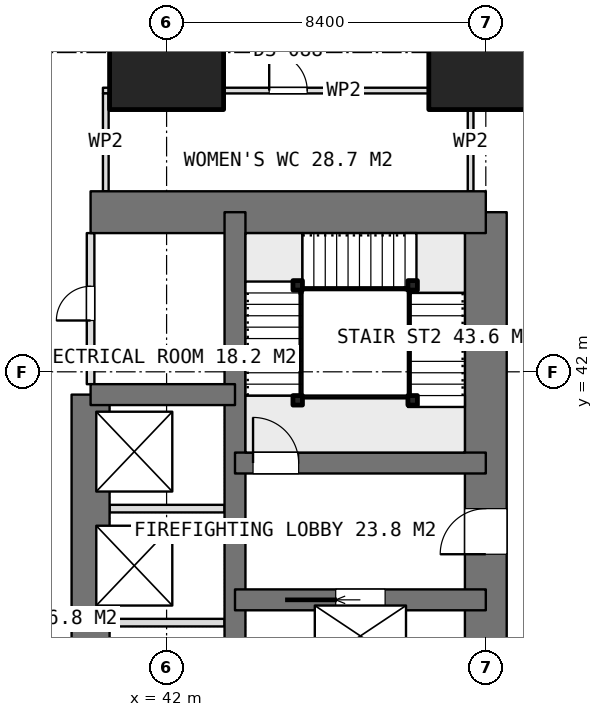
"""IFC4 building model, lengths in metres.
Left out: names, types, materials, properties, quantities, classifications, styles, units other than length and angle.
Written with IfcOpenShell. Run it as: python <this file> out.ifc"""

import sys

from ifc_helpers import new_model, si_unit, direction, frame, frame_2d, origin, origin_2d, place, context, subcontext, project, spatial, rectangle, extrude, element, fill, save


model = new_model("IFC4")
c1 = context("Model", 3, precision=1e-05, world=origin(), true_north=direction((0.0, 1.0)))
c2 = subcontext(c1, "Body", "Model", "MODEL_VIEW")
j1 = project(units=[si_unit("LENGTHUNIT", "METRE"), si_unit("PLANEANGLEUNIT", "RADIAN")], contexts=[c1])
p1 = place(None, origin())
s1 = spatial("IfcSite", under=j1, at=p1, CompositionType="ELEMENT")
p2 = place(p1, origin())
s2 = spatial("IfcBuilding", under=s1, at=p2, CompositionType="ELEMENT")
p3 = place(p2, frame((0.0, 0.0, 77.9)))
s3 = spatial("IfcBuildingStorey", under=s2, at=p3, CompositionType="ELEMENT", Elevation=77.9)
p4 = place(p3, frame((40.0, 46.2, 0.0), z_axis=(0.0, 0.0, 1.0), x_axis=(1.0, 0.0, 0.0)))
e1 = element("IfcWall", 1, at=p4, inside=s3, PredefinedType="SHEAR", context=c2, shape_type="SweptSolid", body=[
    extrude(rectangle(XDim=10.4, YDim=1.1, at=frame_2d((5.2, 0.0))), origin(), (0.0, 0.0, 1.0), 3.75),
])
p5 = place(p3, frame((50.4, 21.0, 0.0), z_axis=(0.0, 0.0, 1.0), x_axis=(0.0, 1.0, 0.0)))
e2 = element("IfcWall", 2, at=p5, inside=s3, PredefinedType="SHEAR", context=c2, shape_type="SweptSolid", body=[
    extrude(rectangle(XDim=25.2, YDim=1.1, at=frame_2d((12.6, 0.0))), origin(), (0.0, 0.0, 1.0), 3.75),
])
p6 = place(p5, frame((16.2, 0.0, 0.0)))
e3 = element("IfcOpeningElement", 3, at=p6, cuts=e2, PredefinedType="OPENING", context=c2, shape_type="SweptSolid", body=[
    extrude(rectangle(XDim=1.2, YDim=2.1, at=frame_2d((0.6, 1.05))), frame((0.0, 0.56, 0.0), z_axis=(0.0, -1.0, 0.0), x_axis=(1.0, 0.0, 0.0)), (0.0, 0.0, 1.0), 1.12),
])
p7 = place(p5, frame((10.05, 0.0, 0.0)))
e4 = element("IfcOpeningElement", 4, at=p7, cuts=e2, PredefinedType="OPENING", context=c2, shape_type="SweptSolid", body=[
    extrude(rectangle(XDim=0.9, YDim=2.1, at=frame_2d((0.45, 1.05))), frame((0.0, 0.56, 0.0), z_axis=(0.0, -1.0, 0.0), x_axis=(1.0, 0.0, 0.0)), (0.0, 0.0, 1.0), 1.12),
])
p8 = place(p5, frame((7.45, 0.0, 0.0)))
e5 = element("IfcOpeningElement", 5, at=p8, cuts=e2, PredefinedType="OPENING", context=c2, shape_type="SweptSolid", body=[
    extrude(rectangle(XDim=0.9, YDim=2.1, at=frame_2d((0.45, 1.05))), frame((0.0, 0.56, 0.0), z_axis=(0.0, -1.0, 0.0), x_axis=(1.0, 0.0, 0.0)), (0.0, 0.0, 1.0), 1.12),
])
p9 = place(p5, frame((0.75, 0.0, 0.0)))
e6 = element("IfcOpeningElement", 6, at=p9, cuts=e2, PredefinedType="OPENING", context=c2, shape_type="SweptSolid", body=[
    extrude(rectangle(XDim=1.2, YDim=2.1, at=frame_2d((0.6, 1.05))), frame((0.0, 0.56, 0.0), z_axis=(0.0, -1.0, 0.0), x_axis=(1.0, 0.0, 0.0)), (0.0, 0.0, 1.0), 1.12),
])
p10 = place(p3, frame((43.8, 21.0, 0.0), z_axis=(0.0, 0.0, 1.0), x_axis=(0.0, 1.0, 0.0)))
e7 = element("IfcWall", 7, at=p10, inside=s3, PredefinedType="SHEAR", context=c2, shape_type="SweptSolid", body=[
    extrude(rectangle(XDim=25.2, YDim=0.55, at=frame_2d((12.6, 0.0))), origin(), (0.0, 0.0, 1.0), 3.75),
])
p11 = place(p3, frame((40.0, 23.4, 0.0), z_axis=(0.0, 0.0, 1.0), x_axis=(0.0, 1.0, 0.0)))
e8 = element("IfcWall", 8, at=p11, inside=s3, PredefinedType="SHEAR", context=c2, shape_type="SweptSolid", body=[
    extrude(rectangle(XDim=18.0, YDim=1.0, at=frame_2d((9.0, 0.0))), origin(), (0.0, 0.0, 1.0), 3.75),
])
p12 = place(p3, frame((40.0, 41.4, 0.0), z_axis=(0.0, 0.0, 1.0), x_axis=(1.0, 0.0, 0.0)))
e9 = element("IfcWall", 9, at=p12, inside=s3, PredefinedType="SHEAR", context=c2, shape_type="SweptSolid", body=[
    extrude(rectangle(XDim=3.8, YDim=0.55, at=frame_2d((1.9, 0.0))), origin(), (0.0, 0.0, 1.0), 3.75),
])
p13 = place(p3, frame((43.8, 36.0, 0.0), z_axis=(0.0, 0.0, 1.0), x_axis=(1.0, 0.0, 0.0)))
e10 = element("IfcWall", 10, at=p13, inside=s3, PredefinedType="SHEAR", context=c2, shape_type="SweptSolid", body=[
    extrude(rectangle(XDim=6.6, YDim=0.55, at=frame_2d((3.3, 0.0))), origin(), (0.0, 0.0, 1.0), 3.75),
])
p14 = place(p13, frame((2.65, 0.0, 0.0)))
e11 = element("IfcOpeningElement", 11, at=p14, cuts=e10, PredefinedType="OPENING", context=c2, shape_type="SweptSolid", body=[
    extrude(rectangle(XDim=1.3, YDim=2.1, at=frame_2d((0.65, 1.05))), frame((0.0, 0.285, 0.0), z_axis=(0.0, -1.0, 0.0), x_axis=(1.0, 0.0, 0.0)), (0.0, 0.0, 1.0), 0.57),
])
p15 = place(p3, frame((43.8, 39.6, 0.0), z_axis=(0.0, 0.0, 1.0), x_axis=(1.0, 0.0, 0.0)))
e12 = element("IfcWall", 12, at=p15, inside=s3, PredefinedType="SHEAR", context=c2, shape_type="SweptSolid", body=[
    extrude(rectangle(XDim=6.6, YDim=0.55, at=frame_2d((3.3, 0.0))), origin(), (0.0, 0.0, 1.0), 3.75),
])
p16 = place(p15, frame((0.475, 0.0, 0.0)))
e13 = element("IfcOpeningElement", 13, at=p16, cuts=e12, PredefinedType="OPENING", context=c2, shape_type="SweptSolid", body=[
    extrude(rectangle(XDim=1.2, YDim=2.1, at=frame_2d((0.6, 1.05))), frame((0.0, 0.285, 0.0), z_axis=(0.0, -1.0, 0.0), x_axis=(1.0, 0.0, 0.0)), (0.0, 0.0, 1.0), 0.57),
])
for number, where, z_axis, x_axis in (
    (14, (42.0, 50.4, 0.0), (0.0, 0.0, 1.0), (1.0, 0.0, 0.0)),
    (15, (50.4, 50.4, 0.0), (0.0, 0.0, 1.0), (1.0, 0.0, 0.0)),
):
    element("IfcColumn", number, at=place(p3, frame(where, z_axis=z_axis, x_axis=x_axis)), inside=s3, PredefinedType="COLUMN", context=c2, shape_type="SweptSolid", body=[
        extrude(rectangle(XDim=3.0, YDim=3.0, at=origin_2d()), origin(), (0.0, 0.0, 1.0), 3.75),
    ])
for number, where, z_axis, x_axis in (
    (16, (40.5, 35.4, 0.0), (0.0, 0.0, 1.0), (1.0, 0.0, 0.0)),
    (17, (40.5, 38.4, 0.0), (0.0, 0.0, 1.0), (1.0, 0.0, 0.0)),
):
    element("IfcWall", number, at=place(p3, frame(where, z_axis=z_axis, x_axis=x_axis)), inside=s3, PredefinedType="PARTITIONING", context=c2, shape_type="SweptSolid", body=[
        extrude(rectangle(XDim=3.025, YDim=0.2, at=frame_2d((1.512, 0.0))), origin(), (0.0, 0.0, 1.0), 3.5),
    ])
p17 = place(p3, frame((40.0, 41.675, 0.0), z_axis=(0.0, 0.0, 1.0), x_axis=(0.0, 1.0, 0.0)))
e18 = element("IfcWall", 18, at=p17, inside=s3, PredefinedType="PARTITIONING", context=c2, shape_type="SweptSolid", body=[
    extrude(rectangle(XDim=3.975, YDim=0.2, at=frame_2d((1.987, 0.0))), origin(), (0.0, 0.0, 1.0), 3.5),
])
p18 = place(p17, frame((1.675, 0.0, 0.0)))
e19 = element("IfcOpeningElement", 19, at=p18, cuts=e18, PredefinedType="OPENING", context=c2, shape_type="SweptSolid", body=[
    extrude(rectangle(XDim=0.9, YDim=2.1, at=frame_2d((0.45, 1.05))), frame((0.0, 0.11, 0.0), z_axis=(0.0, -1.0, 0.0), x_axis=(1.0, 0.0, 0.0)), (0.0, 0.0, 1.0), 0.22),
])
p19 = place(p3, frame((40.325, 49.4, 0.0), z_axis=(0.0, 0.0, 1.0), x_axis=(1.0, 0.0, 0.0)))
e20 = element("IfcWall", 20, at=p19, inside=s3, PredefinedType="PARTITIONING", context=c2, shape_type="SweptSolid", body=[
    extrude(rectangle(XDim=9.75, YDim=0.15, at=frame_2d((4.875, 0.0))), origin(), (0.0, 0.0, 1.0), 3.5),
])
p20 = place(p19, frame((4.375, 0.0, 0.0)))
e21 = element("IfcOpeningElement", 21, at=p20, cuts=e20, PredefinedType="OPENING", context=c2, shape_type="SweptSolid", body=[
    extrude(rectangle(XDim=1.0, YDim=2.1, at=frame_2d((0.5, 1.05))), frame((0.0, 0.085, 0.0), z_axis=(0.0, -1.0, 0.0), x_axis=(1.0, 0.0, 0.0)), (0.0, 0.0, 1.0), 0.17),
])
for number, where, z_axis, x_axis in (
    (22, (40.4, 46.75, 0.0), (0.0, 0.0, 1.0), (0.0, 1.0, 0.0)),
    (23, (50.0, 46.75, 0.0), (0.0, 0.0, 1.0), (0.0, 1.0, 0.0)),
):
    element("IfcWall", number, at=place(p3, frame(where, z_axis=z_axis, x_axis=x_axis)), inside=s3, PredefinedType="PARTITIONING", context=c2, shape_type="SweptSolid", body=[
        extrude(rectangle(XDim=2.575, YDim=0.15, at=frame_2d((1.288, 0.0))), origin(), (0.0, 0.0, 1.0), 3.5),
    ])
for number, where, z_axis, x_axis in (
    (24, (45.45, 41.25, 0.0), (0.0, 0.0, 1.0), (1.0, 0.0, 0.0)),
    (25, (45.45, 44.275, 0.0), (0.0, 0.0, 1.0), (1.0, 0.0, 0.0)),
    (26, (48.475, 44.275, 0.0), (0.0, 0.0, 1.0), (1.0, 0.0, 0.0)),
    (27, (48.475, 41.25, 0.0), (0.0, 0.0, 1.0), (1.0, 0.0, 0.0)),
):
    element("IfcColumn", number, at=place(p3, frame(where, z_axis=z_axis, x_axis=x_axis)), inside=s3, PredefinedType="COLUMN", context=c2, shape_type="SweptSolid", body=[
        extrude(rectangle(XDim=0.25, YDim=0.25, at=origin_2d()), origin(), (0.0, 0.0, 1.0), 3.75),
    ])
p21 = place(p6, origin())
e28 = element("IfcDoor", 28, at=p21, inside=s3, OperationType="SINGLE_SWING_LEFT", PredefinedType="DOOR", context=c2, shape_type="SweptSolid", body=[
    extrude(rectangle(XDim=1.2, YDim=2.1, at=frame_2d((0.6, 1.05))), frame((0.0, 0.025, 0.0), z_axis=(0.0, -1.0, 0.0), x_axis=(1.0, 0.0, 0.0)), (0.0, 0.0, 1.0), 0.05),
])
fill(e3, e28)
p22 = place(p18, origin())
e29 = element("IfcDoor", 29, at=p22, inside=s3, OperationType="SINGLE_SWING_LEFT", PredefinedType="DOOR", context=c2, shape_type="SweptSolid", body=[
    extrude(rectangle(XDim=0.9, YDim=2.1, at=frame_2d((0.45, 1.05))), frame((0.0, 0.025, 0.0), z_axis=(0.0, -1.0, 0.0), x_axis=(1.0, 0.0, 0.0)), (0.0, 0.0, 1.0), 0.05),
])
fill(e19, e29)
p23 = place(p14, origin())
e30 = element("IfcDoor", 30, at=p23, inside=s3, OperationType="SLIDING_TO_LEFT", PredefinedType="USERDEFINED", context=c2, shape_type="SweptSolid", body=[
    extrude(rectangle(XDim=1.3, YDim=2.1, at=frame_2d((0.65, 1.05))), frame((0.0, 0.025, 0.0), z_axis=(0.0, -1.0, 0.0), x_axis=(1.0, 0.0, 0.0)), (0.0, 0.0, 1.0), 0.05),
])
fill(e11, e30)
p24 = place(p20, origin())
e31 = element("IfcDoor", 31, at=p24, inside=s3, OperationType="SINGLE_SWING_LEFT", PredefinedType="DOOR", context=c2, shape_type="SweptSolid", body=[
    extrude(rectangle(XDim=1.0, YDim=2.1, at=frame_2d((0.5, 1.05))), frame((0.0, 0.025, 0.0), z_axis=(0.0, -1.0, 0.0), x_axis=(1.0, 0.0, 0.0)), (0.0, 0.0, 1.0), 0.05),
])
fill(e21, e31)
p25 = place(p16, origin())
e32 = element("IfcDoor", 32, at=p25, inside=s3, OperationType="SINGLE_SWING_RIGHT", PredefinedType="DOOR", context=c2, shape_type="SweptSolid", body=[
    extrude(rectangle(XDim=1.2, YDim=2.1, at=frame_2d((0.6, 1.05))), frame((0.0, 0.025, 0.0), z_axis=(0.0, -1.0, 0.0), x_axis=(1.0, 0.0, 0.0)), (0.0, 0.0, 1.0), 0.05),
])
fill(e13, e32)
save(model, sys.argv[1])
